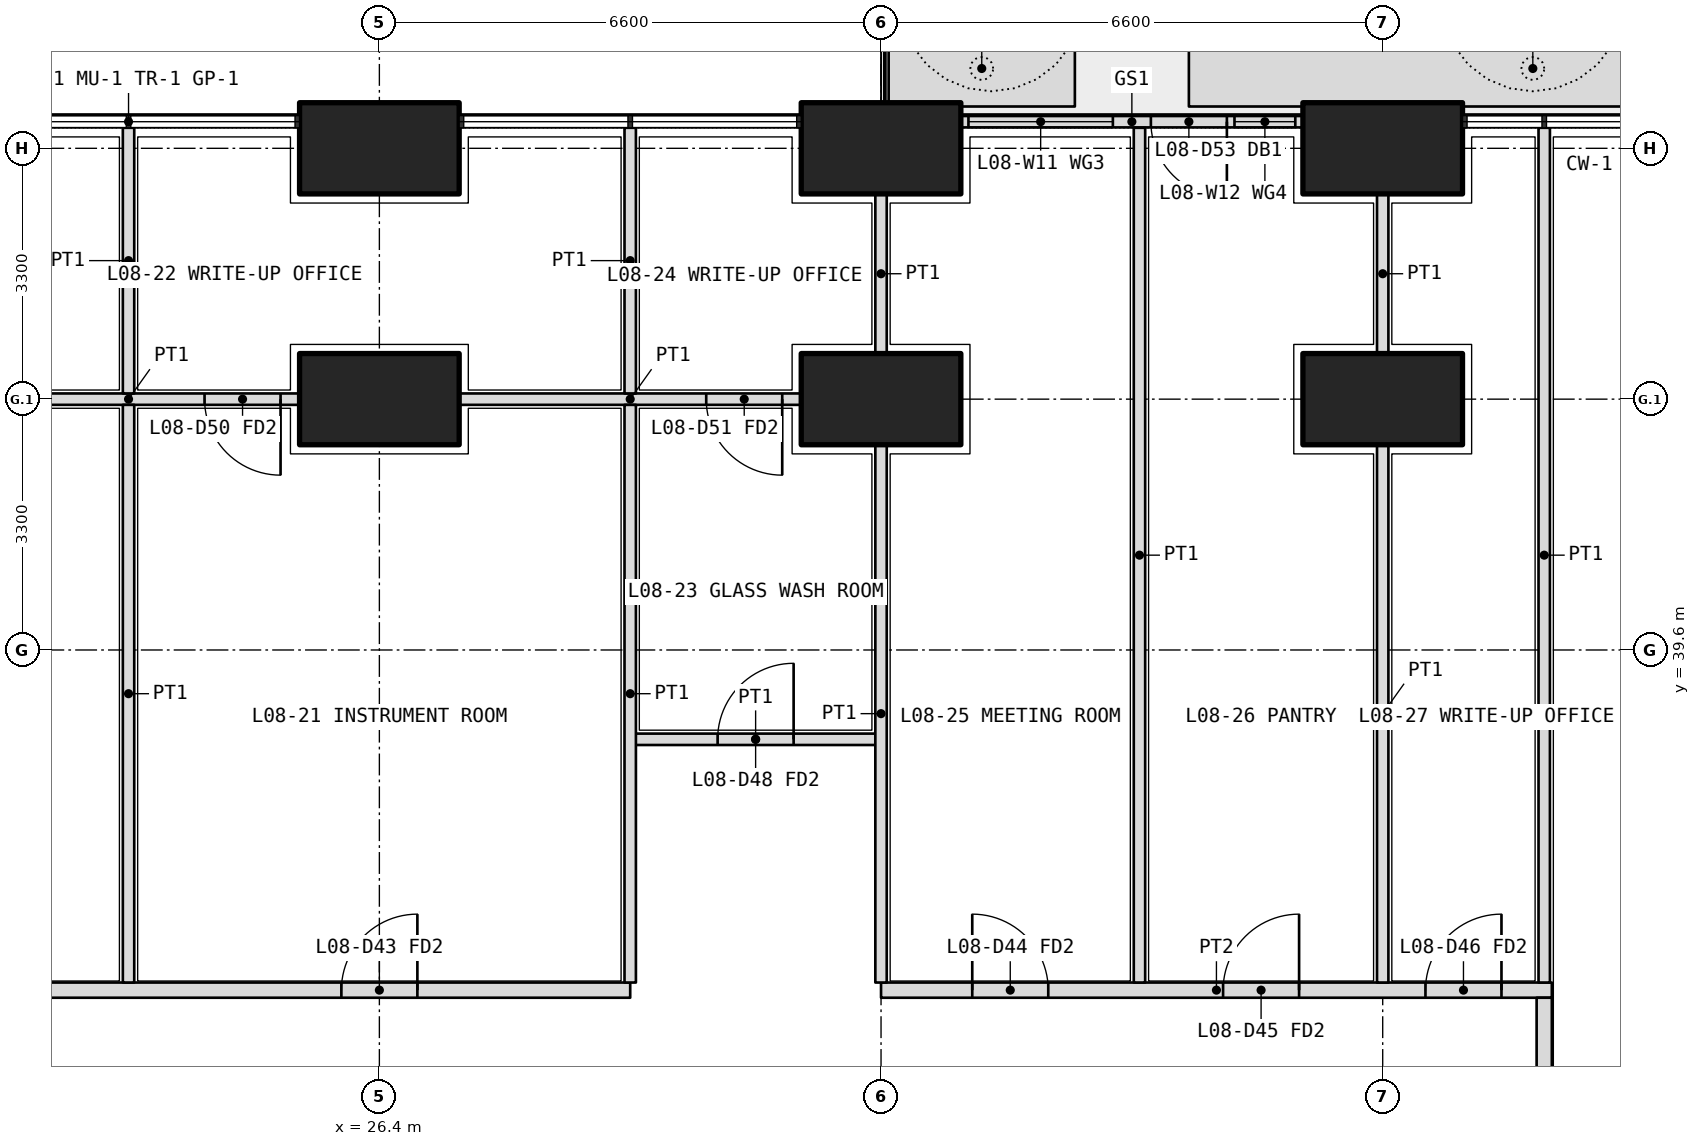
"""IFC4 building model, lengths in metres.
Left out: names, types, materials, properties, quantities, classifications, styles, units other than length and angle.
Written with IfcOpenShell. Run it as: python <this file> out.ifc"""

import sys

from ifc_helpers import new_model, si_unit, direction, frame, frame_2d, origin, origin_2d, place, context, subcontext, project, spatial, polyline, rectangle, outline, extrude, element, fill, save


model = new_model("IFC4")
c1 = context("Model", 3, precision=1e-05, world=origin(), true_north=direction((0.0, 1.0)))
c2 = subcontext(c1, "Body", "Model", "MODEL_VIEW")
j1 = project(units=[si_unit("LENGTHUNIT", "METRE"), si_unit("PLANEANGLEUNIT", "RADIAN")], contexts=[c1])
p1 = place(None, origin())
s1 = spatial("IfcSite", under=j1, at=p1, CompositionType="ELEMENT")
p2 = place(p1, origin())
s2 = spatial("IfcBuilding", under=s1, at=p2, CompositionType="ELEMENT")
p3 = place(p2, frame((0.0, 0.0, 38.1)))
s3 = spatial("IfcBuildingStorey", under=s2, at=p3, CompositionType="ELEMENT", Elevation=38.1)
for number, where, z_axis, x_axis in (
    (1, (26.4, 46.2, 0.0), (0.0, 0.0, 1.0), (1.0, 0.0, 0.0)),
    (2, (33.0, 46.2, 0.0), (0.0, 0.0, 1.0), (1.0, 0.0, 0.0)),
    (3, (39.6, 46.2, 0.0), (0.0, 0.0, 1.0), (1.0, 0.0, 0.0)),
    (4, (26.4, 42.9, 0.0), (0.0, 0.0, 1.0), (1.0, 0.0, 0.0)),
    (5, (33.0, 42.9, 0.0), (0.0, 0.0, 1.0), (1.0, 0.0, 0.0)),
    (6, (39.6, 42.9, 0.0), (0.0, 0.0, 1.0), (1.0, 0.0, 0.0)),
):
    element("IfcColumn", number, at=place(p3, frame(where, z_axis=z_axis, x_axis=x_axis)), inside=s3, PredefinedType="COLUMN", context=c2, shape_type="SweptSolid", body=[
        extrude(rectangle(XDim=2.1, YDim=1.2, at=origin_2d()), origin(), (0.0, 0.0, 1.0), 4.2),
    ])
p4 = place(p3, origin())
e7 = element("IfcWall", 7, at=p4, inside=s3, PredefinedType="USERDEFINED", context=c2, shape_type="SweptSolid", body=[
    extrude(outline(polyline([(33.1, 46.75), (35.55, 46.75), (35.55, 47.75), (33.1, 47.75), (33.1, 46.75)]), holes=[polyline([(33.25, 46.9), (35.4, 46.9), (35.4, 47.6), (33.25, 47.6), (33.25, 46.9)])]), origin(), (0.0, 0.0, 1.0), 1.05),
])
p5 = place(p3, origin())
e8 = element("IfcWall", 8, at=p5, inside=s3, PredefinedType="USERDEFINED", context=c2, shape_type="SweptSolid", body=[
    extrude(outline(polyline([(37.05, 46.75), (46.1, 46.75), (46.1, 47.75), (37.05, 47.75), (37.05, 46.75)]), holes=[polyline([(37.2, 46.9), (45.95, 46.9), (45.95, 47.6), (37.2, 47.6), (37.2, 46.9)])]), origin(), (0.0, 0.0, 1.0), 1.05),
])
p6 = place(p3, frame((38.55, 46.55, 0.0), z_axis=(0.0, 0.0, 1.0), x_axis=(-1.0, 0.0, 0.0)))
e9 = element("IfcWall", 9, at=p6, inside=s3, PredefinedType="SOLIDWALL", context=c2, shape_type="SweptSolid", body=[
    extrude(rectangle(XDim=4.5, YDim=0.15, at=frame_2d((2.25, 0.0))), origin(), (0.0, 0.0, 1.0), 2.7),
])
p7 = place(p6, frame((1.0, 0.0, 0.0)))
e10 = element("IfcOpeningElement", 10, at=p7, cuts=e9, PredefinedType="OPENING", context=c2, shape_type="SweptSolid", body=[
    extrude(rectangle(XDim=1.0, YDim=2.4, at=frame_2d((0.5, 1.2))), frame((0.0, 0.085, 0.0), z_axis=(0.0, -1.0, 0.0), x_axis=(1.0, 0.0, 0.0)), (0.0, 0.0, 1.0), 0.17),
])
p8 = place(p6, frame((0.1, 0.0, 0.1)))
e11 = element("IfcOpeningElement", 11, at=p8, cuts=e9, PredefinedType="OPENING", context=c2, shape_type="SweptSolid", body=[
    extrude(rectangle(XDim=0.8, YDim=2.3, at=frame_2d((0.4, 1.15))), frame((0.0, 0.085, 0.0), z_axis=(0.0, -1.0, 0.0), x_axis=(1.0, 0.0, 0.0)), (0.0, 0.0, 1.0), 0.17),
])
p9 = place(p6, frame((2.5, 0.0, 0.1)))
e12 = element("IfcOpeningElement", 12, at=p9, cuts=e9, PredefinedType="OPENING", context=c2, shape_type="SweptSolid", body=[
    extrude(rectangle(XDim=1.9, YDim=2.3, at=frame_2d((0.95, 1.15))), frame((0.0, 0.085, 0.0), z_axis=(0.0, -1.0, 0.0), x_axis=(1.0, 0.0, 0.0)), (0.0, 0.0, 1.0), 0.17),
])
p10 = place(p3, frame((10.975, 35.125, 0.0), z_axis=(0.0, 0.0, 1.0), x_axis=(1.0, 0.0, 0.0)))
e13 = element("IfcWall", 13, at=p10, inside=s3, PredefinedType="PARTITIONING", context=c2, shape_type="SweptSolid", body=[
    extrude(rectangle(XDim=18.725, YDim=0.2, at=frame_2d((9.362, 0.0))), origin(), (0.0, 0.0, 1.0), 2.85),
])
p11 = place(p10, frame((5.512, 0.0, 0.0)))
e14 = element("IfcOpeningElement", 14, at=p11, cuts=e13, PredefinedType="OPENING", context=c2, shape_type="SweptSolid", body=[
    extrude(rectangle(XDim=1.2, YDim=2.1, at=frame_2d((0.6, 1.05))), frame((0.0, 0.11, 0.0), z_axis=(0.0, -1.0, 0.0), x_axis=(1.0, 0.0, 0.0)), (0.0, 0.0, 1.0), 0.22),
])
p12 = place(p10, frame((14.925, 0.0, 0.0)))
e15 = element("IfcOpeningElement", 15, at=p12, cuts=e13, PredefinedType="OPENING", context=c2, shape_type="SweptSolid", body=[
    extrude(rectangle(XDim=1.0, YDim=2.1, at=frame_2d((0.5, 1.05))), frame((0.0, 0.11, 0.0), z_axis=(0.0, -1.0, 0.0), x_axis=(1.0, 0.0, 0.0)), (0.0, 0.0, 1.0), 0.22),
])
p13 = place(p3, frame((33.0, 35.125, 0.0), z_axis=(0.0, 0.0, 1.0), x_axis=(1.0, 0.0, 0.0)))
e16 = element("IfcWall", 16, at=p13, inside=s3, PredefinedType="PARTITIONING", context=c2, shape_type="SweptSolid", body=[
    extrude(rectangle(XDim=8.825, YDim=0.2, at=frame_2d((4.413, 0.0))), origin(), (0.0, 0.0, 1.0), 2.85),
])
p14 = place(p13, frame((1.2, 0.0, 0.0)))
e17 = element("IfcOpeningElement", 17, at=p14, cuts=e16, PredefinedType="OPENING", context=c2, shape_type="SweptSolid", body=[
    extrude(rectangle(XDim=1.0, YDim=2.1, at=frame_2d((0.5, 1.05))), frame((0.0, 0.11, 0.0), z_axis=(0.0, -1.0, 0.0), x_axis=(1.0, 0.0, 0.0)), (0.0, 0.0, 1.0), 0.22),
])
p15 = place(p13, frame((4.5, 0.0, 0.0)))
e18 = element("IfcOpeningElement", 18, at=p15, cuts=e16, PredefinedType="OPENING", context=c2, shape_type="SweptSolid", body=[
    extrude(rectangle(XDim=1.0, YDim=2.1, at=frame_2d((0.5, 1.05))), frame((0.0, 0.11, 0.0), z_axis=(0.0, -1.0, 0.0), x_axis=(1.0, 0.0, 0.0)), (0.0, 0.0, 1.0), 0.22),
])
p16 = place(p13, frame((7.163, 0.0, 0.0)))
e19 = element("IfcOpeningElement", 19, at=p16, cuts=e16, PredefinedType="OPENING", context=c2, shape_type="SweptSolid", body=[
    extrude(rectangle(XDim=1.0, YDim=2.1, at=frame_2d((0.5, 1.05))), frame((0.0, 0.11, 0.0), z_axis=(0.0, -1.0, 0.0), x_axis=(1.0, 0.0, 0.0)), (0.0, 0.0, 1.0), 0.22),
])
p17 = place(p3, frame((41.725, 11.175, 0.0), z_axis=(0.0, 0.0, 1.0), x_axis=(0.0, 1.0, 0.0)))
e20 = element("IfcWall", 20, at=p17, inside=s3, PredefinedType="PARTITIONING", context=c2, shape_type="SweptSolid", body=[
    extrude(rectangle(XDim=23.85, YDim=0.2, at=frame_2d((11.925, 0.0))), origin(), (0.0, 0.0, 1.0), 2.85),
])
p18 = place(p17, frame((2.113, 0.0, 0.0)))
e21 = element("IfcOpeningElement", 21, at=p18, cuts=e20, PredefinedType="OPENING", context=c2, shape_type="SweptSolid", body=[
    extrude(rectangle(XDim=1.0, YDim=2.1, at=frame_2d((0.5, 1.05))), frame((0.0, 0.11, 0.0), z_axis=(0.0, -1.0, 0.0), x_axis=(1.0, 0.0, 0.0)), (0.0, 0.0, 1.0), 0.22),
])
p19 = place(p17, frame((6.475, 0.0, 0.0)))
e22 = element("IfcOpeningElement", 22, at=p19, cuts=e20, PredefinedType="OPENING", context=c2, shape_type="SweptSolid", body=[
    extrude(rectangle(XDim=1.0, YDim=2.1, at=frame_2d((0.5, 1.05))), frame((0.0, 0.11, 0.0), z_axis=(0.0, -1.0, 0.0), x_axis=(1.0, 0.0, 0.0)), (0.0, 0.0, 1.0), 0.22),
])
p20 = place(p17, frame((9.625, 0.0, 0.0)))
e23 = element("IfcOpeningElement", 23, at=p20, cuts=e20, PredefinedType="OPENING", context=c2, shape_type="SweptSolid", body=[
    extrude(rectangle(XDim=1.0, YDim=2.1, at=frame_2d((0.5, 1.05))), frame((0.0, 0.11, 0.0), z_axis=(0.0, -1.0, 0.0), x_axis=(1.0, 0.0, 0.0)), (0.0, 0.0, 1.0), 0.22),
])
p21 = place(p17, frame((12.975, 0.0, 0.0)))
e24 = element("IfcOpeningElement", 24, at=p21, cuts=e20, PredefinedType="OPENING", context=c2, shape_type="SweptSolid", body=[
    extrude(rectangle(XDim=0.9, YDim=2.1, at=frame_2d((0.45, 1.05))), frame((0.0, 0.11, 0.0), z_axis=(0.0, -1.0, 0.0), x_axis=(1.0, 0.0, 0.0)), (0.0, 0.0, 1.0), 0.22),
])
p22 = place(p17, frame((19.087, 0.0, 0.0)))
e25 = element("IfcOpeningElement", 25, at=p22, cuts=e20, PredefinedType="OPENING", context=c2, shape_type="SweptSolid", body=[
    extrude(rectangle(XDim=1.0, YDim=2.1, at=frame_2d((0.5, 1.05))), frame((0.0, 0.11, 0.0), z_axis=(0.0, -1.0, 0.0), x_axis=(1.0, 0.0, 0.0)), (0.0, 0.0, 1.0), 0.22),
])
p23 = place(p3, frame((41.725, 46.47, 0.0), z_axis=(0.0, 0.0, 1.0), x_axis=(0.0, -1.0, 0.0)))
e26 = element("IfcWall", 26, at=p23, inside=s3, PredefinedType="PARTITIONING", context=c2, shape_type="SweptSolid", body=[
    extrude(rectangle(XDim=11.245, YDim=0.15, at=frame_2d((5.623, 0.0))), origin(), (0.0, 0.0, 1.0), 2.7),
])
p24 = place(p3, frame((31.95, 42.9, 0.0), z_axis=(0.0, 0.0, 1.0), x_axis=(-1.0, 0.0, 0.0)))
e27 = element("IfcWall", 27, at=p24, inside=s3, PredefinedType="PARTITIONING", context=c2, shape_type="SweptSolid", body=[
    extrude(rectangle(XDim=4.5, YDim=0.15, at=frame_2d((2.25, 0.0))), origin(), (0.0, 0.0, 1.0), 3.9),
])
p25 = place(p24, frame((0.25, 0.0, 0.0)))
e28 = element("IfcOpeningElement", 28, at=p25, cuts=e27, PredefinedType="OPENING", context=c2, shape_type="SweptSolid", body=[
    extrude(rectangle(XDim=1.0, YDim=2.1, at=frame_2d((0.5, 1.05))), frame((0.0, 0.085, 0.0), z_axis=(0.0, -1.0, 0.0), x_axis=(1.0, 0.0, 0.0)), (0.0, 0.0, 1.0), 0.17),
])
p26 = place(p3, frame((25.35, 42.9, 0.0), z_axis=(0.0, 0.0, 1.0), x_axis=(-1.0, 0.0, 0.0)))
e29 = element("IfcWall", 29, at=p26, inside=s3, PredefinedType="PARTITIONING", context=c2, shape_type="SweptSolid", body=[
    extrude(rectangle(XDim=4.5, YDim=0.15, at=frame_2d((2.25, 0.0))), origin(), (0.0, 0.0, 1.0), 3.9),
])
p27 = place(p26, frame((0.25, 0.0, 0.0)))
e30 = element("IfcOpeningElement", 30, at=p27, cuts=e29, PredefinedType="OPENING", context=c2, shape_type="SweptSolid", body=[
    extrude(rectangle(XDim=1.0, YDim=2.1, at=frame_2d((0.5, 1.05))), frame((0.0, 0.085, 0.0), z_axis=(0.0, -1.0, 0.0), x_axis=(1.0, 0.0, 0.0)), (0.0, 0.0, 1.0), 0.17),
])
p28 = place(p3, frame((29.7, 38.425, 0.0), z_axis=(0.0, 0.0, 1.0), x_axis=(1.0, 0.0, 0.0)))
e31 = element("IfcWall", 31, at=p28, inside=s3, PredefinedType="PARTITIONING", context=c2, shape_type="SweptSolid", body=[
    extrude(rectangle(XDim=3.3, YDim=0.15, at=frame_2d((1.65, 0.0))), origin(), (0.0, 0.0, 1.0), 2.85),
])
p29 = place(p28, frame((1.15, 0.0, 0.0)))
e32 = element("IfcOpeningElement", 32, at=p29, cuts=e31, PredefinedType="OPENING", context=c2, shape_type="SweptSolid", body=[
    extrude(rectangle(XDim=1.0, YDim=2.1, at=frame_2d((0.5, 1.05))), frame((0.0, 0.085, 0.0), z_axis=(0.0, -1.0, 0.0), x_axis=(1.0, 0.0, 0.0)), (0.0, 0.0, 1.0), 0.17),
])
p30 = place(p3, frame((36.4, 46.47, 0.0), z_axis=(0.0, 0.0, 1.0), x_axis=(0.0, -1.0, 0.0)))
e33 = element("IfcWall", 33, at=p30, inside=s3, PredefinedType="PARTITIONING", context=c2, shape_type="SweptSolid", body=[
    extrude(rectangle(XDim=11.245, YDim=0.15, at=frame_2d((5.623, 0.0))), origin(), (0.0, 0.0, 1.0), 2.7),
])
p31 = place(p3, frame((39.6, 45.6, 0.0), z_axis=(0.0, 0.0, 1.0), x_axis=(0.0, -1.0, 0.0)))
e34 = element("IfcWall", 34, at=p31, inside=s3, PredefinedType="PARTITIONING", context=c2, shape_type="SweptSolid", body=[
    extrude(rectangle(XDim=2.1, YDim=0.15, at=frame_2d((1.05, 0.0))), origin(), (0.0, 0.0, 1.0), 2.85),
])
p32 = place(p3, frame((39.6, 42.3, 0.0), z_axis=(0.0, 0.0, 1.0), x_axis=(0.0, -1.0, 0.0)))
e35 = element("IfcWall", 35, at=p32, inside=s3, PredefinedType="PARTITIONING", context=c2, shape_type="SweptSolid", body=[
    extrude(rectangle(XDim=7.075, YDim=0.15, at=frame_2d((3.538, 0.0))), origin(), (0.0, 0.0, 1.0), 2.85),
])
p33 = place(p3, frame((23.1, 46.47, 0.0), z_axis=(0.0, 0.0, 1.0), x_axis=(0.0, -1.0, 0.0)))
e36 = element("IfcWall", 36, at=p33, inside=s3, PredefinedType="PARTITIONING", context=c2, shape_type="SweptSolid", body=[
    extrude(rectangle(XDim=3.495, YDim=0.15, at=frame_2d((1.748, 0.0))), origin(), (0.0, 0.0, 1.0), 2.7),
])
p34 = place(p3, frame((23.1, 42.825, 0.0), z_axis=(0.0, 0.0, 1.0), x_axis=(0.0, -1.0, 0.0)))
e37 = element("IfcWall", 37, at=p34, inside=s3, PredefinedType="PARTITIONING", context=c2, shape_type="SweptSolid", body=[
    extrude(rectangle(XDim=7.6, YDim=0.15, at=frame_2d((3.8, 0.0))), origin(), (0.0, 0.0, 1.0), 3.9),
])
p35 = place(p3, frame((29.7, 46.47, 0.0), z_axis=(0.0, 0.0, 1.0), x_axis=(0.0, -1.0, 0.0)))
e38 = element("IfcWall", 38, at=p35, inside=s3, PredefinedType="PARTITIONING", context=c2, shape_type="SweptSolid", body=[
    extrude(rectangle(XDim=3.495, YDim=0.15, at=frame_2d((1.748, 0.0))), origin(), (0.0, 0.0, 1.0), 2.7),
])
p36 = place(p3, frame((29.7, 42.825, 0.0), z_axis=(0.0, 0.0, 1.0), x_axis=(0.0, -1.0, 0.0)))
e39 = element("IfcWall", 39, at=p36, inside=s3, PredefinedType="PARTITIONING", context=c2, shape_type="SweptSolid", body=[
    extrude(rectangle(XDim=7.6, YDim=0.15, at=frame_2d((3.8, 0.0))), origin(), (0.0, 0.0, 1.0), 3.9),
])
p37 = place(p3, frame((33.0, 45.6, 0.0), z_axis=(0.0, 0.0, 1.0), x_axis=(0.0, -1.0, 0.0)))
e40 = element("IfcWall", 40, at=p37, inside=s3, PredefinedType="PARTITIONING", context=c2, shape_type="SweptSolid", body=[
    extrude(rectangle(XDim=2.1, YDim=0.15, at=frame_2d((1.05, 0.0))), origin(), (0.0, 0.0, 1.0), 2.85),
])
p38 = place(p3, frame((33.0, 42.3, 0.0), z_axis=(0.0, 0.0, 1.0), x_axis=(0.0, -1.0, 0.0)))
e41 = element("IfcWall", 41, at=p38, inside=s3, PredefinedType="PARTITIONING", context=c2, shape_type="SweptSolid", body=[
    extrude(rectangle(XDim=7.075, YDim=0.15, at=frame_2d((3.538, 0.0))), origin(), (0.0, 0.0, 1.0), 2.85),
])
p39 = place(p7, origin())
e42 = element("IfcDoor", 42, at=p39, inside=s3, OperationType="SINGLE_SWING_LEFT", PredefinedType="DOOR", context=c2, shape_type="SweptSolid", body=[
    extrude(rectangle(XDim=1.0, YDim=2.4, at=frame_2d((0.5, 1.2))), frame((0.0, 0.025, 0.0), z_axis=(0.0, -1.0, 0.0), x_axis=(1.0, 0.0, 0.0)), (0.0, 0.0, 1.0), 0.05),
])
fill(e10, e42)
p40 = place(p8, origin())
e43 = element("IfcWindow", 43, at=p40, inside=s3, PartitioningType="SINGLE_PANEL", PredefinedType="WINDOW", context=c2, shape_type="SweptSolid", body=[
    extrude(rectangle(XDim=0.8, YDim=2.3, at=frame_2d((0.4, 1.15))), frame((0.0, 0.03, 0.0), z_axis=(0.0, -1.0, 0.0), x_axis=(1.0, 0.0, 0.0)), (0.0, 0.0, 1.0), 0.06),
])
fill(e11, e43)
p41 = place(p9, origin())
e44 = element("IfcWindow", 44, at=p41, inside=s3, PartitioningType="SINGLE_PANEL", PredefinedType="WINDOW", context=c2, shape_type="SweptSolid", body=[
    extrude(rectangle(XDim=1.9, YDim=2.3, at=frame_2d((0.95, 1.15))), frame((0.0, 0.03, 0.0), z_axis=(0.0, -1.0, 0.0), x_axis=(1.0, 0.0, 0.0)), (0.0, 0.0, 1.0), 0.06),
])
fill(e12, e44)
p42 = place(p12, origin())
e45 = element("IfcDoor", 45, at=p42, inside=s3, OperationType="SINGLE_SWING_RIGHT", PredefinedType="DOOR", context=c2, shape_type="SweptSolid", body=[
    extrude(rectangle(XDim=1.0, YDim=2.1, at=frame_2d((0.5, 1.05))), frame((0.0, 0.025, 0.0), z_axis=(0.0, -1.0, 0.0), x_axis=(1.0, 0.0, 0.0)), (0.0, 0.0, 1.0), 0.05),
])
fill(e15, e45)
p43 = place(p27, origin())
e46 = element("IfcDoor", 46, at=p43, inside=s3, OperationType="SINGLE_SWING_LEFT", PredefinedType="DOOR", context=c2, shape_type="SweptSolid", body=[
    extrude(rectangle(XDim=1.0, YDim=2.1, at=frame_2d((0.5, 1.05))), frame((0.0, 0.025, 0.0), z_axis=(0.0, -1.0, 0.0), x_axis=(1.0, 0.0, 0.0)), (0.0, 0.0, 1.0), 0.05),
])
fill(e30, e46)
p44 = place(p29, origin())
e47 = element("IfcDoor", 47, at=p44, inside=s3, OperationType="SINGLE_SWING_RIGHT", PredefinedType="DOOR", context=c2, shape_type="SweptSolid", body=[
    extrude(rectangle(XDim=1.0, YDim=2.1, at=frame_2d((0.5, 1.05))), frame((0.0, 0.025, 0.0), z_axis=(0.0, -1.0, 0.0), x_axis=(1.0, 0.0, 0.0)), (0.0, 0.0, 1.0), 0.05),
])
fill(e32, e47)
p45 = place(p25, origin())
e48 = element("IfcDoor", 48, at=p45, inside=s3, OperationType="SINGLE_SWING_LEFT", PredefinedType="DOOR", context=c2, shape_type="SweptSolid", body=[
    extrude(rectangle(XDim=1.0, YDim=2.1, at=frame_2d((0.5, 1.05))), frame((0.0, 0.025, 0.0), z_axis=(0.0, -1.0, 0.0), x_axis=(1.0, 0.0, 0.0)), (0.0, 0.0, 1.0), 0.05),
])
fill(e28, e48)
p46 = place(p14, origin())
e49 = element("IfcDoor", 49, at=p46, inside=s3, OperationType="SINGLE_SWING_LEFT", PredefinedType="DOOR", context=c2, shape_type="SweptSolid", body=[
    extrude(rectangle(XDim=1.0, YDim=2.1, at=frame_2d((0.5, 1.05))), frame((0.0, 0.025, 0.0), z_axis=(0.0, -1.0, 0.0), x_axis=(1.0, 0.0, 0.0)), (0.0, 0.0, 1.0), 0.05),
])
fill(e17, e49)
p47 = place(p15, origin())
e50 = element("IfcDoor", 50, at=p47, inside=s3, OperationType="SINGLE_SWING_RIGHT", PredefinedType="DOOR", context=c2, shape_type="SweptSolid", body=[
    extrude(rectangle(XDim=1.0, YDim=2.1, at=frame_2d((0.5, 1.05))), frame((0.0, 0.025, 0.0), z_axis=(0.0, -1.0, 0.0), x_axis=(1.0, 0.0, 0.0)), (0.0, 0.0, 1.0), 0.05),
])
fill(e18, e50)
p48 = place(p16, origin())
e51 = element("IfcDoor", 51, at=p48, inside=s3, OperationType="SINGLE_SWING_RIGHT", PredefinedType="DOOR", context=c2, shape_type="SweptSolid", body=[
    extrude(rectangle(XDim=1.0, YDim=2.1, at=frame_2d((0.5, 1.05))), frame((0.0, 0.025, 0.0), z_axis=(0.0, -1.0, 0.0), x_axis=(1.0, 0.0, 0.0)), (0.0, 0.0, 1.0), 0.05),
])
fill(e19, e51)
save(model, sys.argv[1])
